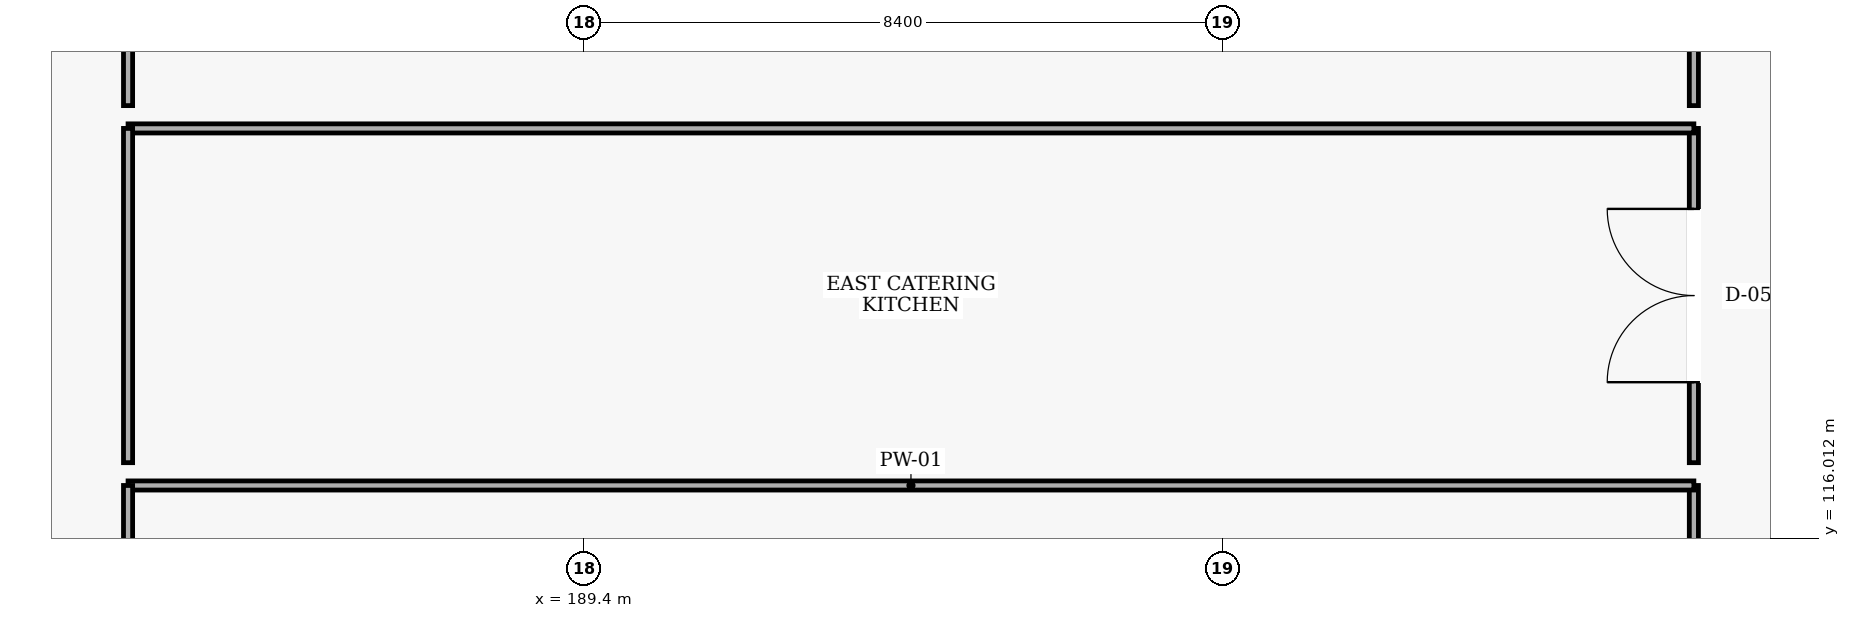
"""IFC4 building model, lengths in metres.
Left out: names, types, materials, properties, quantities, classifications, styles, units other than length and angle.
Written with IfcOpenShell. Run it as: python <this file> out.ifc"""

import sys

from ifc_helpers import new_model, si_unit, direction, frame, frame_2d, origin, place, context, subcontext, project, spatial, rectangle, extrude, element, fill, save


model = new_model("IFC4")
c1 = context("Model", 3, precision=1e-05, world=origin(), true_north=direction((0.0, 1.0)))
c2 = subcontext(c1, "Body", "Model", "MODEL_VIEW")
j1 = project(units=[si_unit("LENGTHUNIT", "METRE"), si_unit("PLANEANGLEUNIT", "RADIAN")], contexts=[c1])
p1 = place(None, origin())
s1 = spatial("IfcSite", under=j1, at=p1, CompositionType="ELEMENT")
p2 = place(p1, origin())
s2 = spatial("IfcBuilding", under=s1, at=p2, CompositionType="ELEMENT")
p3 = place(p2, frame((0.0, 0.0, 10.2)))
s3 = spatial("IfcBuildingStorey", under=s2, at=p3, CompositionType="ELEMENT", Elevation=10.2)
p4 = place(p3, frame((204.0, 112.17, 0.0), z_axis=(0.0, 0.0, 1.0), x_axis=(0.0, 1.0, 0.0)))
e1 = element("IfcWall", 1, at=p4, inside=s3, PredefinedType="PARTITIONING", context=c2, shape_type="SweptSolid", body=[
    extrude(rectangle(XDim=4.54, YDim=0.12, at=frame_2d((2.27, 0.0))), origin(), (0.0, 0.0, 1.0), 4.48),
])
p5 = place(p4, frame((1.19, 0.0, 0.0)))
e2 = element("IfcOpeningElement", 2, at=p5, cuts=e1, PredefinedType="OPENING", context=c2, shape_type="SweptSolid", body=[
    extrude(rectangle(XDim=2.16, YDim=2.35, at=frame_2d((1.08, 1.175))), frame((0.0, 0.07, 0.0), z_axis=(0.0, -1.0, 0.0), x_axis=(1.0, 0.0, 0.0)), (0.0, 0.0, 1.0), 0.14),
])
p6 = place(p3, frame((204.0, 116.71, 0.0), z_axis=(0.0, 0.0, 1.0), x_axis=(-1.0, 0.0, 0.0)))
e3 = element("IfcWall", 3, at=p6, inside=s3, PredefinedType="PARTITIONING", context=c2, shape_type="SweptSolid", body=[
    extrude(rectangle(XDim=20.6, YDim=0.12, at=frame_2d((10.3, 0.0))), origin(), (0.0, 0.0, 1.0), 4.48),
])
p7 = place(p3, frame((183.4, 116.71, 0.0), z_axis=(0.0, 0.0, 1.0), x_axis=(0.0, -1.0, 0.0)))
e4 = element("IfcWall", 4, at=p7, inside=s3, PredefinedType="PARTITIONING", context=c2, shape_type="SweptSolid", body=[
    extrude(rectangle(XDim=4.54, YDim=0.12, at=frame_2d((2.27, 0.0))), origin(), (0.0, 0.0, 1.0), 4.48),
])
p8 = place(p3, frame((204.0, 117.01, 0.0), z_axis=(0.0, 0.0, 1.0), x_axis=(0.0, 1.0, 0.0)))
e5 = element("IfcWall", 5, at=p8, inside=s3, PredefinedType="PARTITIONING", context=c2, shape_type="SweptSolid", body=[
    extrude(rectangle(XDim=4.397, YDim=0.12, at=frame_2d((2.199, 0.0))), origin(), (0.0, 0.0, 1.0), 4.48),
])
p9 = place(p8, frame((1.059, 0.0, 0.0)))
e6 = element("IfcOpeningElement", 6, at=p9, cuts=e5, PredefinedType="OPENING", context=c2, shape_type="SweptSolid", body=[
    extrude(rectangle(XDim=2.28, YDim=2.4, at=frame_2d((1.14, 1.2))), frame((0.0, 0.07, 0.0), z_axis=(0.0, -1.0, 0.0), x_axis=(1.0, 0.0, 0.0)), (0.0, 0.0, 1.0), 0.14),
])
p10 = place(p3, frame((204.0, 121.407, 0.0), z_axis=(0.0, 0.0, 1.0), x_axis=(-1.0, 0.0, 0.0)))
e7 = element("IfcWall", 7, at=p10, inside=s3, PredefinedType="PARTITIONING", context=c2, shape_type="SweptSolid", body=[
    extrude(rectangle(XDim=20.6, YDim=0.12, at=frame_2d((10.3, 0.0))), origin(), (0.0, 0.0, 1.0), 4.48),
])
p11 = place(p3, frame((183.4, 121.407, 0.0), z_axis=(0.0, 0.0, 1.0), x_axis=(0.0, -1.0, 0.0)))
e8 = element("IfcWall", 8, at=p11, inside=s3, PredefinedType="PARTITIONING", context=c2, shape_type="SweptSolid", body=[
    extrude(rectangle(XDim=4.397, YDim=0.12, at=frame_2d((2.199, 0.0))), origin(), (0.0, 0.0, 1.0), 4.48),
])
p12 = place(p3, frame((204.0, 121.708, 0.0), z_axis=(0.0, 0.0, 1.0), x_axis=(0.0, 1.0, 0.0)))
e9 = element("IfcWall", 9, at=p12, inside=s3, PredefinedType="PARTITIONING", context=c2, shape_type="SweptSolid", body=[
    extrude(rectangle(XDim=4.397, YDim=0.12, at=frame_2d((2.199, 0.0))), origin(), (0.0, 0.0, 1.0), 4.48),
])
p13 = place(p12, frame((1.019, 0.0, 0.0)))
e10 = element("IfcOpeningElement", 10, at=p13, cuts=e9, PredefinedType="OPENING", context=c2, shape_type="SweptSolid", body=[
    extrude(rectangle(XDim=2.36, YDim=2.4, at=frame_2d((1.18, 1.2))), frame((0.0, 0.07, 0.0), z_axis=(0.0, -1.0, 0.0), x_axis=(1.0, 0.0, 0.0)), (0.0, 0.0, 1.0), 0.14),
])
p14 = place(p3, frame((183.4, 126.105, 0.0), z_axis=(0.0, 0.0, 1.0), x_axis=(0.0, -1.0, 0.0)))
e11 = element("IfcWall", 11, at=p14, inside=s3, PredefinedType="PARTITIONING", context=c2, shape_type="SweptSolid", body=[
    extrude(rectangle(XDim=4.397, YDim=0.12, at=frame_2d((2.199, 0.0))), origin(), (0.0, 0.0, 1.0), 4.48),
])
p15 = place(p9, origin())
e12 = element("IfcDoor", 12, at=p15, inside=s3, OperationType="DOUBLE_DOOR_SINGLE_SWING", PredefinedType="DOOR", context=c2, shape_type="SweptSolid", body=[
    extrude(rectangle(XDim=2.28, YDim=2.4, at=frame_2d((1.14, 1.2))), frame((0.0, 0.025, 0.0), z_axis=(0.0, -1.0, 0.0), x_axis=(1.0, 0.0, 0.0)), (0.0, 0.0, 1.0), 0.05),
])
fill(e6, e12)
save(model, sys.argv[1])
